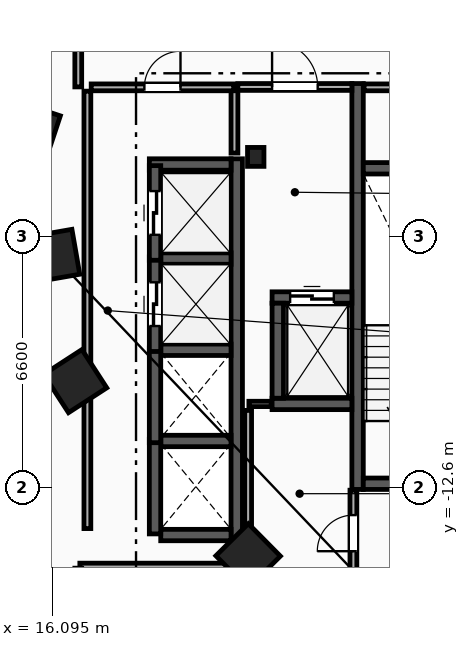
"""IFC4 building model, lengths in metres.
Left out: names, types, materials, properties, quantities, classifications, styles, units other than length and angle.
Written with IfcOpenShell. Run it as: python <this file> out.ifc"""

import sys

from ifc_helpers import new_model, si_unit, direction, frame, frame_2d, origin, origin_2d, place, context, subcontext, project, spatial, rectangle, i_section, extrude, element, fill, save


model = new_model("IFC4")
c1 = context("Model", 3, precision=1e-05, world=origin(), true_north=direction((0.0, 1.0)))
c2 = subcontext(c1, "Body", "Model", "MODEL_VIEW")
j1 = project(units=[si_unit("LENGTHUNIT", "METRE"), si_unit("PLANEANGLEUNIT", "RADIAN")], contexts=[c1])
p1 = place(None, origin())
s1 = spatial("IfcSite", under=j1, at=p1, CompositionType="ELEMENT")
p2 = place(p1, origin())
s2 = spatial("IfcBuilding", under=s1, at=p2, CompositionType="ELEMENT")
p3 = place(p2, frame((0.0, 0.0, 35.4)))
s3 = spatial("IfcBuildingStorey", under=s2, at=p3, CompositionType="ELEMENT", Elevation=35.4)
p4 = place(p3, frame((21.45, -3.9, 0.0), z_axis=(0.0, 0.0, 1.0), x_axis=(1.0, 0.0, 0.0)))
e1 = element("IfcColumn", 1, at=p4, inside=s3, PredefinedType="COLUMN", context=c2, shape_type="SweptSolid", body=[
    extrude(i_section(OverallWidth=0.432, OverallDepth=0.498, WebThickness=0.056, FlangeThickness=0.089, FilletRadius=0.018, at=origin_2d()), origin(), (0.0, 0.0, 1.0), 3.8),
])
for number, where, z_axis, x_axis in (
    (2, (15.55, -3.2, 0.0), (0.0, 0.0, 1.0), (-0.315, -0.949, 0.0)),
    (3, (16.125, -6.5, 0.0), (0.0, 0.0, 1.0), (0.172, -0.985, 0.0)),
    (4, (16.7, -9.8, 0.0), (0.0, 0.0, 1.0), (0.544, -0.839, 0.0)),
    (5, (21.25, -14.4, 0.0), (0.0, 0.0, 1.0), (0.703, -0.711, 0.0)),
):
    element("IfcColumn", number, at=place(p3, frame(where, z_axis=z_axis, x_axis=x_axis)), inside=s3, PredefinedType="COLUMN", context=c2, shape_type="SweptSolid", body=[
        extrude(rectangle(XDim=1.2, YDim=1.2, at=origin_2d()), origin(), (0.0, 0.0, 1.0), 3.8),
    ])
p5 = place(p3, frame((24.13, -12.65, 0.0), z_axis=(0.0, 0.0, 1.0), x_axis=(0.0, 1.0, 0.0)))
e6 = element("IfcWall", 6, at=p5, inside=s3, PredefinedType="SHEAR", context=c2, shape_type="SweptSolid", body=[
    extrude(rectangle(XDim=10.68, YDim=0.3, at=frame_2d((5.34, 0.0))), origin(), (0.0, 0.0, 1.0), 3.5),
])
p6 = place(p3, frame((24.28, -12.5, 0.0), z_axis=(0.0, 0.0, 1.0), x_axis=(1.0, 0.0, 0.0)))
e7 = element("IfcWall", 7, at=p6, inside=s3, PredefinedType="SHEAR", context=c2, shape_type="SweptSolid", body=[
    extrude(rectangle(XDim=3.16, YDim=0.3, at=frame_2d((1.58, 0.0))), origin(), (0.0, 0.0, 1.0), 3.5),
])
p7 = place(p6, frame((1.03, 0.0, 0.0)))
e8 = element("IfcOpeningElement", 8, at=p7, cuts=e7, PredefinedType="OPENING", context=c2, shape_type="SweptSolid", body=[
    extrude(rectangle(XDim=1.1, YDim=2.15, at=frame_2d((0.55, 1.075))), frame((0.0, 0.16, 0.0), z_axis=(0.0, -1.0, 0.0), x_axis=(1.0, 0.0, 0.0)), (0.0, 0.0, 1.0), 0.32),
])
p8 = place(p3, frame((24.28, -4.2, 0.0), z_axis=(0.0, 0.0, 1.0), x_axis=(1.0, 0.0, 0.0)))
e9 = element("IfcWall", 9, at=p8, inside=s3, PredefinedType="SHEAR", context=c2, shape_type="SweptSolid", body=[
    extrude(rectangle(XDim=3.16, YDim=0.3, at=frame_2d((1.58, 0.0))), origin(), (0.0, 0.0, 1.0), 3.5),
])
p9 = place(p3, frame((20.89, -3.8, 0.0), z_axis=(0.0, 0.0, 1.0), x_axis=(0.0, 1.0, 0.0)))
e10 = element("IfcWall", 10, at=p9, inside=s3, PredefinedType="PARTITIONING", context=c2, shape_type="SweptSolid", body=[
    extrude(rectangle(XDim=1.65, YDim=0.18, at=frame_2d((0.825, 0.0))), origin(), (0.0, 0.0, 1.0), 3.5),
])
p10 = place(p3, frame((20.98, -2.06, 0.0), z_axis=(0.0, 0.0, 1.0), x_axis=(1.0, 0.0, 0.0)))
e11 = element("IfcWall", 11, at=p10, inside=s3, PredefinedType="PARTITIONING", context=c2, shape_type="SweptSolid", body=[
    extrude(rectangle(XDim=3.0, YDim=0.18, at=frame_2d((1.5, 0.0))), origin(), (0.0, 0.0, 1.0), 3.5),
])
p11 = place(p10, frame((0.9, 0.0, 0.0)))
e12 = element("IfcOpeningElement", 12, at=p11, cuts=e11, PredefinedType="OPENING", context=c2, shape_type="SweptSolid", body=[
    extrude(rectangle(XDim=1.2, YDim=2.15, at=frame_2d((0.6, 1.075))), frame((0.0, 0.1, 0.0), z_axis=(0.0, -1.0, 0.0), x_axis=(1.0, 0.0, 0.0)), (0.0, 0.0, 1.0), 0.2),
])
p12 = place(p3, frame((21.88, -7.6, 0.0), z_axis=(0.0, 0.0, 1.0), x_axis=(1.0, 0.0, 0.0)))
e13 = element("IfcWall", 13, at=p12, inside=s3, PredefinedType="SHEAR", context=c2, shape_type="SweptSolid", body=[
    extrude(rectangle(XDim=2.1, YDim=0.3, at=frame_2d((1.05, 0.0))), origin(), (0.0, 0.0, 1.0), 3.5),
])
p13 = place(p12, frame((0.475, 0.0, 0.0)))
e14 = element("IfcOpeningElement", 14, at=p13, cuts=e13, PredefinedType="OPENING", context=c2, shape_type="SweptSolid", body=[
    extrude(rectangle(XDim=1.15, YDim=2.2, at=frame_2d((0.575, 1.1))), frame((0.0, 0.16, 0.0), z_axis=(0.0, -1.0, 0.0), x_axis=(1.0, 0.0, 0.0)), (0.0, 0.0, 1.0), 0.32),
])
p14 = place(p3, frame((21.88, -10.4, 0.0), z_axis=(0.0, 0.0, 1.0), x_axis=(1.0, 0.0, 0.0)))
e15 = element("IfcWall", 15, at=p14, inside=s3, PredefinedType="SHEAR", context=c2, shape_type="SweptSolid", body=[
    extrude(rectangle(XDim=2.1, YDim=0.3, at=frame_2d((1.05, 0.0))), origin(), (0.0, 0.0, 1.0), 3.5),
])
p15 = place(p3, frame((22.03, -10.25, 0.0), z_axis=(0.0, 0.0, 1.0), x_axis=(0.0, 1.0, 0.0)))
e16 = element("IfcWall", 16, at=p15, inside=s3, PredefinedType="SHEAR", context=c2, shape_type="SweptSolid", body=[
    extrude(rectangle(XDim=2.5, YDim=0.3, at=frame_2d((1.25, 0.0))), origin(), (0.0, 0.0, 1.0), 3.5),
])
p16 = place(p3, frame((20.95, -14.0, 0.0), z_axis=(0.0, 0.0, 1.0), x_axis=(0.0, 1.0, 0.0)))
e17 = element("IfcWall", 17, at=p16, inside=s3, PredefinedType="SHEAR", context=c2, shape_type="SweptSolid", body=[
    extrude(rectangle(XDim=10.05, YDim=0.3, at=frame_2d((5.025, 0.0))), origin(), (0.0, 0.0, 1.0), 3.5),
])
p17 = place(p3, frame((18.95, -13.85, 0.0), z_axis=(0.0, 0.0, 1.0), x_axis=(1.0, 0.0, 0.0)))
e18 = element("IfcWall", 18, at=p17, inside=s3, PredefinedType="SHEAR", context=c2, shape_type="SweptSolid", body=[
    extrude(rectangle(XDim=1.85, YDim=0.3, at=frame_2d((0.925, 0.0))), origin(), (0.0, 0.0, 1.0), 3.5),
])
p18 = place(p3, frame((18.65, -4.1, 0.0), z_axis=(0.0, 0.0, 1.0), x_axis=(1.0, 0.0, 0.0)))
e19 = element("IfcWall", 19, at=p18, inside=s3, PredefinedType="SHEAR", context=c2, shape_type="SweptSolid", body=[
    extrude(rectangle(XDim=2.15, YDim=0.3, at=frame_2d((1.075, 0.0))), origin(), (0.0, 0.0, 1.0), 3.5),
])
for number, where, z_axis, x_axis in (
    (20, (18.95, -11.375, 0.0), (0.0, 0.0, 1.0), (1.0, 0.0, 0.0)),
    (21, (18.95, -8.975, 0.0), (0.0, 0.0, 1.0), (1.0, 0.0, 0.0)),
    (22, (18.95, -6.575, 0.0), (0.0, 0.0, 1.0), (1.0, 0.0, 0.0)),
):
    element("IfcWall", number, at=place(p3, frame(where, z_axis=z_axis, x_axis=x_axis)), inside=s3, PredefinedType="SHEAR", context=c2, shape_type="SweptSolid", body=[
        extrude(rectangle(XDim=1.85, YDim=0.3, at=frame_2d((0.925, 0.0))), origin(), (0.0, 0.0, 1.0), 3.5),
    ])
for number, where, z_axis, x_axis in (
    (23, (18.8, -13.82, 0.0), (0.0, 0.0, 1.0), (0.0, 1.0, 0.0)),
    (24, (18.8, -11.42, 0.0), (0.0, 0.0, 1.0), (0.0, 1.0, 0.0)),
):
    element("IfcWall", number, at=place(p3, frame(where, z_axis=z_axis, x_axis=x_axis)), inside=s3, PredefinedType="SHEAR", context=c2, shape_type="SweptSolid", body=[
        extrude(rectangle(XDim=2.49, YDim=0.3, at=frame_2d((1.245, 0.0))), origin(), (0.0, 0.0, 1.0), 3.5),
    ])
p19 = place(p3, frame((18.8, -9.02, 0.0), z_axis=(0.0, 0.0, 1.0), x_axis=(0.0, 1.0, 0.0)))
e25 = element("IfcWall", 25, at=p19, inside=s3, PredefinedType="SHEAR", context=c2, shape_type="SweptSolid", body=[
    extrude(rectangle(XDim=2.49, YDim=0.3, at=frame_2d((1.245, 0.0))), origin(), (0.0, 0.0, 1.0), 3.5),
])
p20 = place(p19, frame((0.67, 0.0, 0.0)))
e26 = element("IfcOpeningElement", 26, at=p20, cuts=e25, PredefinedType="OPENING", context=c2, shape_type="SweptSolid", body=[
    extrude(rectangle(XDim=1.15, YDim=2.2, at=frame_2d((0.575, 1.1))), frame((0.0, 0.16, 0.0), z_axis=(0.0, -1.0, 0.0), x_axis=(1.0, 0.0, 0.0)), (0.0, 0.0, 1.0), 0.32),
])
p21 = place(p3, frame((18.8, -6.62, 0.0), z_axis=(0.0, 0.0, 1.0), x_axis=(0.0, 1.0, 0.0)))
e27 = element("IfcWall", 27, at=p21, inside=s3, PredefinedType="SHEAR", context=c2, shape_type="SweptSolid", body=[
    extrude(rectangle(XDim=2.49, YDim=0.3, at=frame_2d((1.245, 0.0))), origin(), (0.0, 0.0, 1.0), 3.5),
])
p22 = place(p21, frame((0.67, 0.0, 0.0)))
e28 = element("IfcOpeningElement", 28, at=p22, cuts=e27, PredefinedType="OPENING", context=c2, shape_type="SweptSolid", body=[
    extrude(rectangle(XDim=1.15, YDim=2.2, at=frame_2d((0.575, 1.1))), frame((0.0, 0.16, 0.0), z_axis=(0.0, -1.0, 0.0), x_axis=(1.0, 0.0, 0.0)), (0.0, 0.0, 1.0), 0.32),
])
p23 = place(p3, frame((17.02, -13.68, 0.0), z_axis=(0.0, 0.0, 1.0), x_axis=(0.0, 1.0, 0.0)))
e29 = element("IfcWall", 29, at=p23, inside=s3, PredefinedType="PARTITIONING", context=c2, shape_type="SweptSolid", body=[
    extrude(rectangle(XDim=11.51, YDim=0.18, at=frame_2d((5.755, 0.0))), origin(), (0.0, 0.0, 1.0), 3.5),
])
p24 = place(p3, frame((17.12, -2.07, 0.0), z_axis=(0.0, 0.0, 1.0), x_axis=(1.0, 0.0, 0.0)))
e30 = element("IfcWall", 30, at=p24, inside=s3, PredefinedType="PARTITIONING", context=c2, shape_type="SweptSolid", body=[
    extrude(rectangle(XDim=3.75, YDim=0.18, at=frame_2d((1.875, 0.0))), origin(), (0.0, 0.0, 1.0), 3.5),
])
p25 = place(p24, frame((1.4, 0.0, 0.0)))
e31 = element("IfcOpeningElement", 31, at=p25, cuts=e30, PredefinedType="OPENING", context=c2, shape_type="SweptSolid", body=[
    extrude(rectangle(XDim=0.95, YDim=2.1, at=frame_2d((0.475, 1.05))), frame((0.0, 0.1, 0.0), z_axis=(0.0, -1.0, 0.0), x_axis=(1.0, 0.0, 0.0)), (0.0, 0.0, 1.0), 0.2),
])
p26 = place(p3, frame((21.27, -10.4, 0.0), z_axis=(0.0, 0.0, 1.0), x_axis=(1.0, 0.0, 0.0)))
e32 = element("IfcWall", 32, at=p26, inside=s3, PredefinedType="PARTITIONING", context=c2, shape_type="SweptSolid", body=[
    extrude(rectangle(XDim=0.59, YDim=0.14, at=frame_2d((0.295, 0.0))), origin(), (0.0, 0.0, 1.0), 3.5),
])
p27 = place(p3, frame((21.25, -14.93, 0.0), z_axis=(0.0, 0.0, 1.0), x_axis=(0.0, 1.0, 0.0)))
e33 = element("IfcWall", 33, at=p27, inside=s3, PredefinedType="PARTITIONING", context=c2, shape_type="SweptSolid", body=[
    extrude(rectangle(XDim=4.36, YDim=0.18, at=frame_2d((2.18, 0.0))), origin(), (0.0, 0.0, 1.0), 3.5),
])
p28 = place(p3, frame((24.3, -2.07, 0.0), z_axis=(0.0, 0.0, 1.0), x_axis=(1.0, 0.0, 0.0)))
e34 = element("IfcWall", 34, at=p28, inside=s3, PredefinedType="PARTITIONING", context=c2, shape_type="SweptSolid", body=[
    extrude(rectangle(XDim=3.12, YDim=0.18, at=frame_2d((1.56, 0.0))), origin(), (0.0, 0.0, 1.0), 3.5),
])
p29 = place(p28, frame((1.085, 0.0, 0.0)))
e35 = element("IfcOpeningElement", 35, at=p29, cuts=e34, PredefinedType="OPENING", context=c2, shape_type="SweptSolid", body=[
    extrude(rectangle(XDim=0.95, YDim=2.1, at=frame_2d((0.475, 1.05))), frame((0.0, 0.1, 0.0), z_axis=(0.0, -1.0, 0.0), x_axis=(1.0, 0.0, 0.0)), (0.0, 0.0, 1.0), 0.2),
])
p30 = place(p3, frame((24.02, -14.93, 0.0), z_axis=(0.0, 0.0, 1.0), x_axis=(0.0, 1.0, 0.0)))
e36 = element("IfcWall", 36, at=p30, inside=s3, PredefinedType="PARTITIONING", context=c2, shape_type="SweptSolid", body=[
    extrude(rectangle(XDim=2.26, YDim=0.18, at=frame_2d((1.13, 0.0))), origin(), (0.0, 0.0, 1.0), 3.5),
])
p31 = place(p30, frame((0.655, 0.0, 0.0)))
e37 = element("IfcOpeningElement", 37, at=p31, cuts=e36, PredefinedType="OPENING", context=c2, shape_type="SweptSolid", body=[
    extrude(rectangle(XDim=0.95, YDim=2.1, at=frame_2d((0.475, 1.05))), frame((0.0, 0.1, 0.0), z_axis=(0.0, -1.0, 0.0), x_axis=(1.0, 0.0, 0.0)), (0.0, 0.0, 1.0), 0.2),
])
p32 = place(p3, frame((21.178, -14.68, 0.0), z_axis=(0.0, 0.0, 1.0), x_axis=(-1.0, 0.0, 0.0)))
e38 = element("IfcWall", 38, at=p32, inside=s3, PredefinedType="PARTITIONING", context=c2, shape_type="SweptSolid", body=[
    extrude(rectangle(XDim=4.357, YDim=0.18, at=frame_2d((2.178, 0.0))), origin(), (0.0, 0.0, 1.0), 3.5),
])
p33 = place(p3, frame((16.78, 0.329, 0.0), z_axis=(0.0, 0.0, 1.0), x_axis=(0.0, -1.0, 0.0)))
e39 = element("IfcWall", 39, at=p33, inside=s3, PredefinedType="PARTITIONING", context=c2, shape_type="SweptSolid", body=[
    extrude(rectangle(XDim=2.387, YDim=0.18, at=frame_2d((1.194, 0.0))), origin(), (0.0, 0.0, 1.0), 3.5),
])
p34 = place(p11, origin())
e40 = element("IfcDoor", 40, at=p34, inside=s3, OperationType="SINGLE_SWING_LEFT", PredefinedType="DOOR", context=c2, shape_type="SweptSolid", body=[
    extrude(rectangle(XDim=1.2, YDim=2.15, at=frame_2d((0.6, 1.075))), frame((0.0, 0.025, 0.0), z_axis=(0.0, -1.0, 0.0), x_axis=(1.0, 0.0, 0.0)), (0.0, 0.0, 1.0), 0.05),
])
fill(e12, e40)
p35 = place(p13, origin())
e41 = element("IfcDoor", 41, at=p35, inside=s3, OperationType="SLIDING_TO_LEFT", PredefinedType="TRAPDOOR", context=c2, shape_type="SweptSolid", body=[
    extrude(rectangle(XDim=1.15, YDim=2.2, at=frame_2d((0.575, 1.1))), frame((0.0, 0.025, 0.0), z_axis=(0.0, -1.0, 0.0), x_axis=(1.0, 0.0, 0.0)), (0.0, 0.0, 1.0), 0.05),
])
fill(e14, e41)
p36 = place(p20, origin())
e42 = element("IfcDoor", 42, at=p36, inside=s3, OperationType="SLIDING_TO_LEFT", PredefinedType="TRAPDOOR", context=c2, shape_type="SweptSolid", body=[
    extrude(rectangle(XDim=1.15, YDim=2.2, at=frame_2d((0.575, 1.1))), frame((0.0, 0.025, 0.0), z_axis=(0.0, -1.0, 0.0), x_axis=(1.0, 0.0, 0.0)), (0.0, 0.0, 1.0), 0.05),
])
fill(e26, e42)
p37 = place(p22, origin())
e43 = element("IfcDoor", 43, at=p37, inside=s3, OperationType="SLIDING_TO_LEFT", PredefinedType="TRAPDOOR", context=c2, shape_type="SweptSolid", body=[
    extrude(rectangle(XDim=1.15, YDim=2.2, at=frame_2d((0.575, 1.1))), frame((0.0, 0.025, 0.0), z_axis=(0.0, -1.0, 0.0), x_axis=(1.0, 0.0, 0.0)), (0.0, 0.0, 1.0), 0.05),
])
fill(e28, e43)
p38 = place(p25, origin())
e44 = element("IfcDoor", 44, at=p38, inside=s3, OperationType="SINGLE_SWING_RIGHT", PredefinedType="DOOR", context=c2, shape_type="SweptSolid", body=[
    extrude(rectangle(XDim=0.95, YDim=2.1, at=frame_2d((0.475, 1.05))), frame((0.0, 0.025, 0.0), z_axis=(0.0, -1.0, 0.0), x_axis=(1.0, 0.0, 0.0)), (0.0, 0.0, 1.0), 0.05),
])
fill(e31, e44)
p39 = place(p31, origin())
e45 = element("IfcDoor", 45, at=p39, inside=s3, OperationType="SINGLE_SWING_LEFT", PredefinedType="DOOR", context=c2, shape_type="SweptSolid", body=[
    extrude(rectangle(XDim=0.95, YDim=2.1, at=frame_2d((0.475, 1.05))), frame((0.0, 0.025, 0.0), z_axis=(0.0, -1.0, 0.0), x_axis=(1.0, 0.0, 0.0)), (0.0, 0.0, 1.0), 0.05),
])
fill(e37, e45)
save(model, sys.argv[1])
